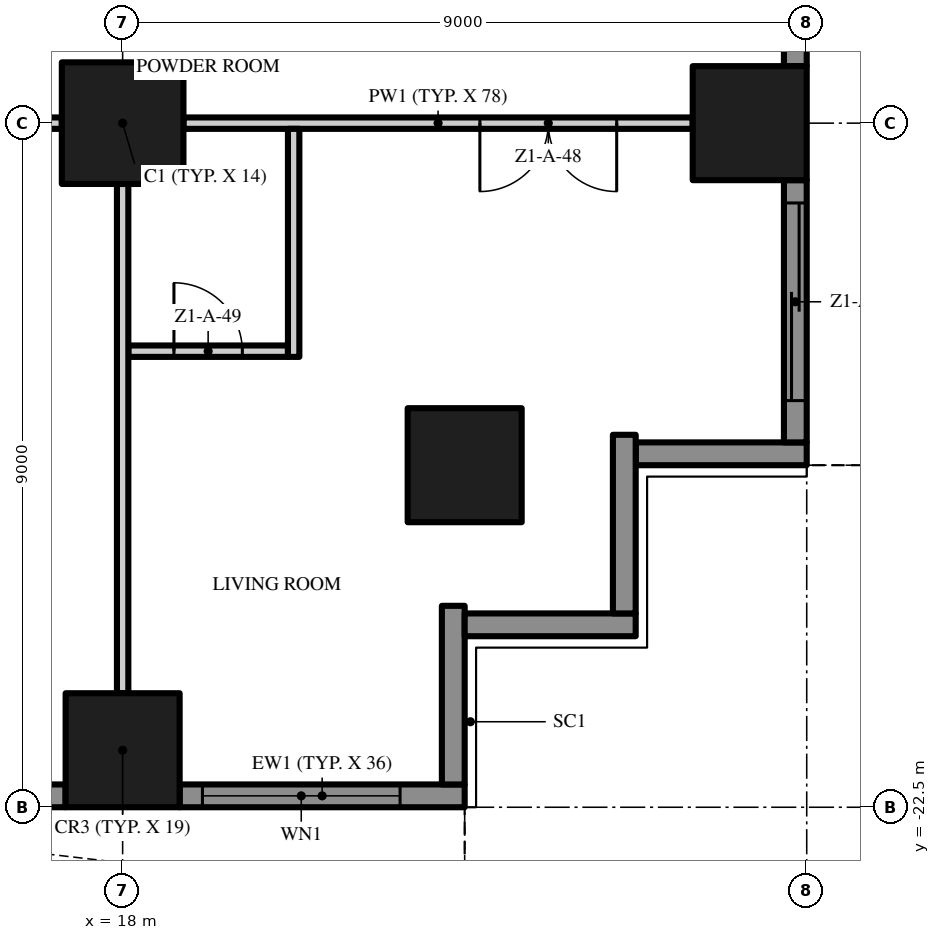
"""IFC4 building model, lengths in metres.
Left out: names, types, materials, properties, quantities, classifications, styles, units other than length and angle.
Written with IfcOpenShell. Run it as: python <this file> out.ifc"""

import sys

from ifc_helpers import new_model, si_unit, direction, frame, frame_2d, origin, origin_2d, place, context, subcontext, project, spatial, polyline, rectangle, outline, extrude, element, fill, save


model = new_model("IFC4")
c1 = context("Model", 3, precision=1e-05, world=origin(), true_north=direction((0.0, 1.0)))
c2 = subcontext(c1, "Body", "Model", "MODEL_VIEW")
j1 = project(units=[si_unit("LENGTHUNIT", "METRE"), si_unit("PLANEANGLEUNIT", "RADIAN")], contexts=[c1])
p1 = place(None, origin())
s1 = spatial("IfcSite", under=j1, at=p1, CompositionType="ELEMENT")
p2 = place(p1, origin())
s2 = spatial("IfcBuilding", under=s1, at=p2, CompositionType="ELEMENT")
p3 = place(p2, frame((0.0, 0.0, 18.8)))
s3 = spatial("IfcBuildingStorey", under=s2, at=p3, CompositionType="ELEMENT", Elevation=18.8)
p4 = place(p3, frame((18.0, -13.5, 0.0), z_axis=(0.0, 0.0, 1.0), x_axis=(1.0, 0.0, 0.0)))
e1 = element("IfcColumn", 1, at=p4, inside=s3, PredefinedType="COLUMN", context=c2, shape_type="SweptSolid", body=[
    extrude(rectangle(XDim=1.6, YDim=1.6, at=origin_2d()), origin(), (0.0, 0.0, 1.0), 3.5),
])
for number, where, z_axis, x_axis in (
    (2, (18.0, -21.75, 0.0), (0.0, 0.0, 1.0), (1.0, 0.0, 0.0)),
    (3, (26.25, -13.5, 0.0), (0.0, 0.0, 1.0), (1.0, 0.0, 0.0)),
    (4, (22.5, -18.0, 0.0), (0.0, 0.0, 1.0), (1.0, 0.0, 0.0)),
):
    element("IfcColumn", number, at=place(p3, frame(where, z_axis=z_axis, x_axis=x_axis)), inside=s3, PredefinedType="COLUMN", context=c2, shape_type="SweptSolid", body=[
        extrude(rectangle(XDim=1.5, YDim=1.5, at=origin_2d()), origin(), (0.0, 0.0, 1.0), 3.5),
    ])
p5 = place(p3, frame((17.25, -22.35, 0.0), z_axis=(0.0, 0.0, 1.0), x_axis=(-1.0, 0.0, 0.0)))
e5 = element("IfcWall", 5, at=p5, inside=s3, PredefinedType="SOLIDWALL", context=c2, shape_type="SweptSolid", body=[
    extrude(rectangle(XDim=7.5, YDim=0.3, at=frame_2d((3.75, 0.0))), origin(), (0.0, 0.0, 1.0), 3.5),
])
p6 = place(p5, frame((4.6, 0.0, 0.0)))
e6 = element("IfcOpeningElement", 6, at=p6, cuts=e5, PredefinedType="OPENING", context=c2, shape_type="SweptSolid", body=[
    extrude(rectangle(XDim=2.6, YDim=2.4, at=frame_2d((1.3, 1.2))), frame((0.0, 0.16, 0.0), z_axis=(0.0, -1.0, 0.0), x_axis=(1.0, 0.0, 0.0)), (0.0, 0.0, 1.0), 0.32),
])
p7 = place(p5, frame((0.3, 0.0, 0.45)))
e7 = element("IfcOpeningElement", 7, at=p7, cuts=e5, PredefinedType="OPENING", context=c2, shape_type="SweptSolid", body=[
    extrude(rectangle(XDim=2.6, YDim=2.65, at=frame_2d((1.3, 1.325))), frame((0.0, 0.16, 0.0), z_axis=(0.0, -1.0, 0.0), x_axis=(1.0, 0.0, 0.0)), (0.0, 0.0, 1.0), 0.32),
])
p8 = place(p3, frame((22.5, -22.35, 0.0), z_axis=(0.0, 0.0, 1.0), x_axis=(-1.0, 0.0, 0.0)))
e8 = element("IfcWall", 8, at=p8, inside=s3, PredefinedType="SOLIDWALL", context=c2, shape_type="SweptSolid", body=[
    extrude(rectangle(XDim=3.75, YDim=0.3, at=frame_2d((1.875, 0.0))), origin(), (0.0, 0.0, 1.0), 3.5),
])
p9 = place(p8, frame((0.85, 0.0, 0.45)))
e9 = element("IfcOpeningElement", 9, at=p9, cuts=e8, PredefinedType="OPENING", context=c2, shape_type="SweptSolid", body=[
    extrude(rectangle(XDim=2.6, YDim=2.65, at=frame_2d((1.3, 1.325))), frame((0.0, 0.16, 0.0), z_axis=(0.0, -1.0, 0.0), x_axis=(1.0, 0.0, 0.0)), (0.0, 0.0, 1.0), 0.32),
])
p10 = place(p3, frame((22.35, -19.85, 0.0), z_axis=(0.0, 0.0, 1.0), x_axis=(0.0, -1.0, 0.0)))
e10 = element("IfcWall", 10, at=p10, inside=s3, PredefinedType="SOLIDWALL", context=c2, shape_type="SweptSolid", body=[
    extrude(rectangle(XDim=2.35, YDim=0.3, at=frame_2d((1.175, 0.0))), origin(), (0.0, 0.0, 1.0), 3.5),
])
p11 = place(p3, frame((24.75, -20.1, 0.0), z_axis=(0.0, 0.0, 1.0), x_axis=(-1.0, 0.0, 0.0)))
e11 = element("IfcWall", 11, at=p11, inside=s3, PredefinedType="SOLIDWALL", context=c2, shape_type="SweptSolid", body=[
    extrude(rectangle(XDim=2.25, YDim=0.3, at=frame_2d((1.125, 0.0))), origin(), (0.0, 0.0, 1.0), 3.5),
])
p12 = place(p3, frame((24.6, -17.6, 0.0), z_axis=(0.0, 0.0, 1.0), x_axis=(0.0, -1.0, 0.0)))
e12 = element("IfcWall", 12, at=p12, inside=s3, PredefinedType="SOLIDWALL", context=c2, shape_type="SweptSolid", body=[
    extrude(rectangle(XDim=2.35, YDim=0.3, at=frame_2d((1.175, 0.0))), origin(), (0.0, 0.0, 1.0), 3.5),
])
p13 = place(p3, frame((27.0, -17.85, 0.0), z_axis=(0.0, 0.0, 1.0), x_axis=(-1.0, 0.0, 0.0)))
e13 = element("IfcWall", 13, at=p13, inside=s3, PredefinedType="SOLIDWALL", context=c2, shape_type="SweptSolid", body=[
    extrude(rectangle(XDim=2.25, YDim=0.3, at=frame_2d((1.125, 0.0))), origin(), (0.0, 0.0, 1.0), 3.5),
])
p14 = place(p3, frame((26.85, -14.25, 0.0), z_axis=(0.0, 0.0, 1.0), x_axis=(0.0, -1.0, 0.0)))
e14 = element("IfcWall", 14, at=p14, inside=s3, PredefinedType="SOLIDWALL", context=c2, shape_type="SweptSolid", body=[
    extrude(rectangle(XDim=3.45, YDim=0.3, at=frame_2d((1.725, 0.0))), origin(), (0.0, 0.0, 1.0), 3.5),
])
p15 = place(p14, frame((0.3, 0.0, 0.0)))
e15 = element("IfcOpeningElement", 15, at=p15, cuts=e14, PredefinedType="OPENING", context=c2, shape_type="SweptSolid", body=[
    extrude(rectangle(XDim=2.6, YDim=2.4, at=frame_2d((1.3, 1.2))), frame((0.0, 0.16, 0.0), z_axis=(0.0, -1.0, 0.0), x_axis=(1.0, 0.0, 0.0)), (0.0, 0.0, 1.0), 0.32),
])
p16 = place(p3, frame((26.85, -5.25, 0.0), z_axis=(0.0, 0.0, 1.0), x_axis=(0.0, -1.0, 0.0)))
e16 = element("IfcWall", 16, at=p16, inside=s3, PredefinedType="SOLIDWALL", context=c2, shape_type="SweptSolid", body=[
    extrude(rectangle(XDim=7.5, YDim=0.3, at=frame_2d((3.75, 0.0))), origin(), (0.0, 0.0, 1.0), 3.5),
])
p17 = place(p16, frame((4.6, 0.0, 0.45)))
e17 = element("IfcOpeningElement", 17, at=p17, cuts=e16, PredefinedType="OPENING", context=c2, shape_type="SweptSolid", body=[
    extrude(rectangle(XDim=2.6, YDim=2.65, at=frame_2d((1.3, 1.325))), frame((0.0, 0.16, 0.0), z_axis=(0.0, -1.0, 0.0), x_axis=(1.0, 0.0, 0.0)), (0.0, 0.0, 1.0), 0.32),
])
p18 = place(p16, frame((0.3, 0.0, 0.45)))
e18 = element("IfcOpeningElement", 18, at=p18, cuts=e16, PredefinedType="OPENING", context=c2, shape_type="SweptSolid", body=[
    extrude(rectangle(XDim=2.6, YDim=2.65, at=frame_2d((1.3, 1.325))), frame((0.0, 0.16, 0.0), z_axis=(0.0, -1.0, 0.0), x_axis=(1.0, 0.0, 0.0)), (0.0, 0.0, 1.0), 0.32),
])
p19 = place(p3, origin())
e19 = element("IfcWall", 19, at=p19, inside=s3, PredefinedType="USERDEFINED", context=c2, shape_type="SweptSolid", body=[
    extrude(outline(polyline([(-22.5, -25.149), (-21.0, -25.485), (-20.625, -25.5), (-19.5, -25.369), (-18.0, -24.845), (-16.5, -24.112), (-15.0, -23.451), (-13.5, -23.115), (-13.125, -23.1), (-12.0, -23.231), (-10.5, -23.755), (-9.0, -24.488), (-7.5, -25.149), (-6.0, -25.485), (-5.625, -25.5), (-4.5, -25.369), (-3.0, -24.845), (-1.5, -24.112), (0.0, -23.451), (1.5, -23.115), (1.875, -23.1), (3.0, -23.231), (4.5, -23.755), (6.0, -24.488), (7.5, -25.149), (9.0, -25.485), (9.375, -25.5), (10.5, -25.369), (12.0, -24.845), (13.5, -24.112), (15.0, -23.451), (16.5, -23.115), (16.875, -23.1), (18.0, -23.231), (19.5, -23.755), (21.0, -24.488), (22.5, -25.149), (22.601, -24.92), (21.105, -24.261), (19.596, -23.524), (18.056, -22.986), (16.885, -22.849), (16.467, -22.866), (14.921, -23.213), (13.395, -23.885), (11.904, -24.614), (10.444, -25.124), (9.365, -25.249), (9.033, -25.236), (7.579, -24.91), (6.105, -24.261), (4.596, -23.524), (3.056, -22.986), (1.885, -22.849), (1.467, -22.866), (-0.079, -23.213), (-1.605, -23.885), (-3.096, -24.614), (-4.556, -25.124), (-5.635, -25.249), (-5.967, -25.236), (-7.421, -24.91), (-8.895, -24.261), (-10.404, -23.524), (-11.944, -22.986), (-13.115, -22.849), (-13.533, -22.866), (-15.079, -23.213), (-16.605, -23.885), (-18.096, -24.614), (-19.556, -25.124), (-20.635, -25.249), (-20.967, -25.236), (-22.445, -24.905), (-22.5, -25.149)])), origin(), (0.0, 0.0, 1.0), 0.9),
])
p20 = place(p3, origin())
e20 = element("IfcWall", 20, at=p20, inside=s3, PredefinedType="USERDEFINED", context=c2, shape_type="SweptSolid", body=[
    extrude(outline(polyline([(29.649, -18.0), (29.985, -16.5), (30.0, -16.125), (29.869, -15.0), (29.345, -13.5), (28.612, -12.0), (27.951, -10.5), (27.615, -9.0), (27.6, -8.625), (27.731, -7.5), (28.255, -6.0), (28.988, -4.5), (29.649, -3.0), (29.985, -1.5), (30.0, -1.125), (29.869, 0.0), (29.345, 1.5), (28.612, 3.0), (27.951, 4.5), (27.615, 6.0), (27.6, 6.375), (27.731, 7.5), (28.255, 9.0), (28.988, 10.5), (29.649, 12.0), (29.985, 13.5), (30.0, 13.875), (29.869, 15.0), (29.345, 16.5), (28.612, 18.0), (28.388, 17.89), (29.114, 16.404), (29.624, 14.944), (29.749, 13.865), (29.736, 13.533), (29.41, 12.079), (28.761, 10.605), (28.024, 9.096), (27.486, 7.556), (27.349, 6.385), (27.366, 5.967), (27.713, 4.421), (28.385, 2.895), (29.114, 1.404), (29.624, -0.056), (29.749, -1.135), (29.736, -1.467), (29.41, -2.921), (28.761, -4.395), (28.024, -5.904), (27.486, -7.444), (27.349, -8.615), (27.366, -9.033), (27.713, -10.579), (28.385, -12.105), (29.114, -13.596), (29.624, -15.056), (29.749, -16.135), (29.736, -16.467), (29.405, -17.945), (29.649, -18.0)])), origin(), (0.0, 0.0, 1.0), 0.9),
])
p21 = place(p3, frame((18.075, -16.5, 0.0), z_axis=(0.0, 0.0, 1.0), x_axis=(1.0, 0.0, 0.0)))
e21 = element("IfcWall", 21, at=p21, inside=s3, PredefinedType="PARTITIONING", context=c2, shape_type="SweptSolid", body=[
    extrude(rectangle(XDim=2.1, YDim=0.15, at=frame_2d((1.05, 0.0))), origin(), (0.0, 0.0, 1.0), 3.5),
])
p22 = place(p21, frame((0.6, 0.0, 0.0)))
e22 = element("IfcOpeningElement", 22, at=p22, cuts=e21, PredefinedType="OPENING", context=c2, shape_type="SweptSolid", body=[
    extrude(rectangle(XDim=0.9, YDim=2.1, at=frame_2d((0.45, 1.05))), frame((0.0, 0.085, 0.0), z_axis=(0.0, -1.0, 0.0), x_axis=(1.0, 0.0, 0.0)), (0.0, 0.0, 1.0), 0.17),
])
p23 = place(p3, frame((17.2, -13.5, 0.0), z_axis=(0.0, 0.0, 1.0), x_axis=(-1.0, 0.0, 0.0)))
e23 = element("IfcWall", 23, at=p23, inside=s3, PredefinedType="PARTITIONING", context=c2, shape_type="SweptSolid", body=[
    extrude(rectangle(XDim=7.4, YDim=0.15, at=frame_2d((3.7, 0.0))), origin(), (0.0, 0.0, 1.0), 3.5),
])
p24 = place(p23, frame((6.25, 0.0, 0.0)))
e24 = element("IfcOpeningElement", 24, at=p24, cuts=e23, PredefinedType="OPENING", context=c2, shape_type="SweptSolid", body=[
    extrude(rectangle(XDim=1.0, YDim=2.4, at=frame_2d((0.5, 1.2))), frame((0.0, 0.085, 0.0), z_axis=(0.0, -1.0, 0.0), x_axis=(1.0, 0.0, 0.0)), (0.0, 0.0, 1.0), 0.17),
])
p25 = place(p23, frame((0.15, 0.0, 0.0)))
e25 = element("IfcOpeningElement", 25, at=p25, cuts=e23, PredefinedType="OPENING", context=c2, shape_type="SweptSolid", body=[
    extrude(rectangle(XDim=1.0, YDim=2.4, at=frame_2d((0.5, 1.2))), frame((0.0, 0.085, 0.0), z_axis=(0.0, -1.0, 0.0), x_axis=(1.0, 0.0, 0.0)), (0.0, 0.0, 1.0), 0.17),
])
p26 = place(p3, frame((25.5, -13.5, 0.0), z_axis=(0.0, 0.0, 1.0), x_axis=(-1.0, 0.0, 0.0)))
e26 = element("IfcWall", 26, at=p26, inside=s3, PredefinedType="PARTITIONING", context=c2, shape_type="SweptSolid", body=[
    extrude(rectangle(XDim=6.7, YDim=0.15, at=frame_2d((3.35, 0.0))), origin(), (0.0, 0.0, 1.0), 3.5),
])
p27 = place(p26, frame((1.0, 0.0, 0.0)))
e27 = element("IfcOpeningElement", 27, at=p27, cuts=e26, PredefinedType="OPENING", context=c2, shape_type="SweptSolid", body=[
    extrude(rectangle(XDim=1.8, YDim=2.4, at=frame_2d((0.9, 1.2))), frame((0.0, 0.085, 0.0), z_axis=(0.0, -1.0, 0.0), x_axis=(1.0, 0.0, 0.0)), (0.0, 0.0, 1.0), 0.17),
])
p28 = place(p3, frame((18.0, -21.0, 0.0), z_axis=(0.0, 0.0, 1.0), x_axis=(0.0, 1.0, 0.0)))
e28 = element("IfcWall", 28, at=p28, inside=s3, PredefinedType="PARTITIONING", context=c2, shape_type="SweptSolid", body=[
    extrude(rectangle(XDim=6.7, YDim=0.15, at=frame_2d((3.35, 0.0))), origin(), (0.0, 0.0, 1.0), 3.5),
])
p29 = place(p3, frame((20.25, -16.575, 0.0), z_axis=(0.0, 0.0, 1.0), x_axis=(0.0, 1.0, 0.0)))
e29 = element("IfcWall", 29, at=p29, inside=s3, PredefinedType="PARTITIONING", context=c2, shape_type="SweptSolid", body=[
    extrude(rectangle(XDim=3.0, YDim=0.15, at=frame_2d((1.5, 0.0))), origin(), (0.0, 0.0, 1.0), 3.5),
])
p30 = place(p9, origin())
e30 = element("IfcWindow", 30, at=p30, inside=s3, PartitioningType="SINGLE_PANEL", PredefinedType="WINDOW", context=c2, shape_type="SweptSolid", body=[
    extrude(rectangle(XDim=2.6, YDim=2.65, at=frame_2d((1.3, 1.325))), frame((0.0, 0.03, 0.0), z_axis=(0.0, -1.0, 0.0), x_axis=(1.0, 0.0, 0.0)), (0.0, 0.0, 1.0), 0.06),
])
fill(e9, e30)
p31 = place(p15, origin())
e31 = element("IfcDoor", 31, at=p31, inside=s3, OperationType="SINGLE_SWING_LEFT", PredefinedType="DOOR", context=c2, shape_type="SweptSolid", body=[
    extrude(rectangle(XDim=2.6, YDim=2.4, at=frame_2d((1.3, 1.2))), frame((0.0, 0.025, 0.0), z_axis=(0.0, -1.0, 0.0), x_axis=(1.0, 0.0, 0.0)), (0.0, 0.0, 1.0), 0.05),
])
fill(e15, e31)
p32 = place(p27, origin())
e32 = element("IfcDoor", 32, at=p32, inside=s3, OperationType="DOUBLE_DOOR_SINGLE_SWING", PredefinedType="DOOR", context=c2, shape_type="SweptSolid", body=[
    extrude(rectangle(XDim=1.8, YDim=2.4, at=frame_2d((0.9, 1.2))), frame((0.0, 0.025, 0.0), z_axis=(0.0, -1.0, 0.0), x_axis=(1.0, 0.0, 0.0)), (0.0, 0.0, 1.0), 0.05),
])
fill(e27, e32)
p33 = place(p22, origin())
e33 = element("IfcDoor", 33, at=p33, inside=s3, OperationType="SINGLE_SWING_LEFT", PredefinedType="DOOR", context=c2, shape_type="SweptSolid", body=[
    extrude(rectangle(XDim=0.9, YDim=2.1, at=frame_2d((0.45, 1.05))), frame((0.0, 0.025, 0.0), z_axis=(0.0, -1.0, 0.0), x_axis=(1.0, 0.0, 0.0)), (0.0, 0.0, 1.0), 0.05),
])
fill(e22, e33)
save(model, sys.argv[1])
